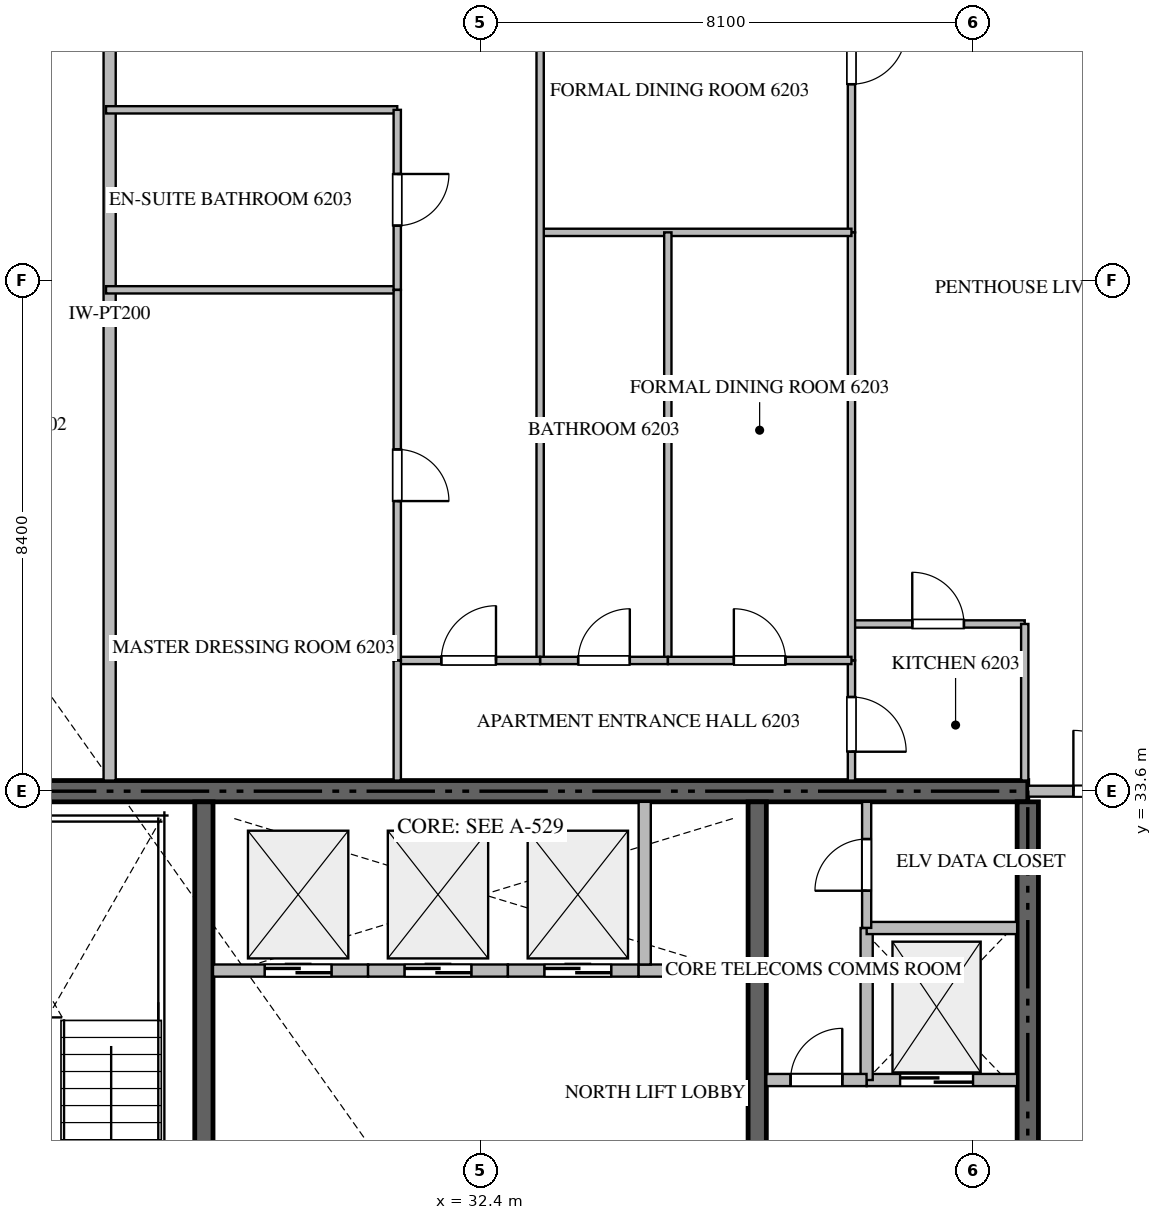
"""IFC4 building model, lengths in metres.
Left out: names, types, materials, properties, quantities, classifications, styles, units other than length and angle.
Written with IfcOpenShell. Run it as: python <this file> out.ifc"""

import sys

from ifc_helpers import new_model, si_unit, direction, frame, frame_2d, origin, place, context, subcontext, project, spatial, rectangle, extrude, source, transform, mapped, element, fill, save


model = new_model("IFC4")
c1 = context("Model", 3, precision=1e-05, world=origin(), true_north=direction((0.0, 1.0)))
c2 = subcontext(c1, "Body", "Model", "MODEL_VIEW")
j1 = project(units=[si_unit("LENGTHUNIT", "METRE"), si_unit("PLANEANGLEUNIT", "RADIAN")], contexts=[c1])
p1 = place(None, origin())
s1 = spatial("IfcSite", under=j1, at=p1, CompositionType="ELEMENT")
p2 = place(p1, origin())
s2 = spatial("IfcBuilding", under=s1, at=p2, CompositionType="ELEMENT")
p3 = place(p2, frame((0.0, 0.0, 248.95)))
s3 = spatial("IfcBuildingStorey", under=s2, at=p3, CompositionType="ELEMENT", Elevation=248.95)
p4 = place(p3, frame((41.4, 33.6, -0.26), z_axis=(0.0, 0.0, 1.0), x_axis=(-1.0, 0.0, 0.0)))
e1 = element("IfcWall", 1, at=p4, inside=s3, PredefinedType="SHEAR", context=c2, shape_type="SweptSolid", body=[
    extrude(rectangle(XDim=18.0, YDim=0.35, at=frame_2d((9.0, 0.0))), origin(), (0.0, 0.0, 1.0), 3.848),
])
p5 = place(p3, frame((41.4, 27.75, -0.26), z_axis=(0.0, 0.0, 1.0), x_axis=(0.0, 1.0, 0.0)))
e2 = element("IfcWall", 2, at=p5, inside=s3, PredefinedType="SHEAR", context=c2, shape_type="SweptSolid", body=[
    extrude(rectangle(XDim=5.675, YDim=0.35, at=frame_2d((2.837, 0.0))), origin(), (0.0, 0.0, 1.0), 3.848),
])
p6 = place(p3, frame((27.85, 23.55, -0.26), z_axis=(0.0, 0.0, 1.0), x_axis=(0.0, 1.0, 0.0)))
e3 = element("IfcWall", 3, at=p6, inside=s3, PredefinedType="SHEAR", context=c2, shape_type="SweptSolid", body=[
    extrude(rectangle(XDim=9.875, YDim=0.3, at=frame_2d((4.938, 0.0))), origin(), (0.0, 0.0, 1.0), 3.848),
])
p7 = place(p3, frame((36.95, 27.05, -0.26), z_axis=(0.0, 0.0, 1.0), x_axis=(0.0, 1.0, 0.0)))
e4 = element("IfcWall", 4, at=p7, inside=s3, PredefinedType="SHEAR", context=c2, shape_type="SweptSolid", body=[
    extrude(rectangle(XDim=6.375, YDim=0.3, at=frame_2d((3.188, 0.0))), origin(), (0.0, 0.0, 1.0), 3.848),
])
p8 = place(p3, frame((38.75, 28.85, 0.0), z_axis=(0.0, 0.0, 1.0), x_axis=(1.0, 0.0, 0.0)))
e5 = element("IfcWall", 5, at=p8, inside=s3, PredefinedType="STANDARD", context=c2, shape_type="SweptSolid", body=[
    extrude(rectangle(XDim=2.475, YDim=0.2, at=frame_2d((1.238, 0.0))), origin(), (0.0, 0.0, 1.0), 3.59),
])
p9 = place(p8, frame((0.55, 0.0, 0.0)))
e6 = element("IfcOpeningElement", 6, at=p9, cuts=e5, PredefinedType="OPENING", context=c2, shape_type="SweptSolid", body=[
    extrude(rectangle(XDim=1.2, YDim=2.2, at=frame_2d((0.6, 1.1))), frame((0.0, 0.11, 0.0), z_axis=(0.0, -1.0, 0.0), x_axis=(1.0, 0.0, 0.0)), (0.0, 0.0, 1.0), 0.22),
])
p10 = place(p3, frame((28.0, 30.65, 0.0), z_axis=(0.0, 0.0, 1.0), x_axis=(1.0, 0.0, 0.0)))
e7 = element("IfcWall", 7, at=p10, inside=s3, PredefinedType="STANDARD", context=c2, shape_type="SweptSolid", body=[
    extrude(rectangle(XDim=2.55, YDim=0.2, at=frame_2d((1.275, 0.0))), origin(), (0.0, 0.0, 1.0), 3.59),
])
p11 = place(p10, frame((0.85, 0.0, 0.0)))
e8 = element("IfcOpeningElement", 8, at=p11, cuts=e7, PredefinedType="OPENING", context=c2, shape_type="SweptSolid", body=[
    extrude(rectangle(XDim=1.1, YDim=2.2, at=frame_2d((0.55, 1.1))), frame((0.0, 0.11, 0.0), z_axis=(0.0, -1.0, 0.0), x_axis=(1.0, 0.0, 0.0)), (0.0, 0.0, 1.0), 0.22),
])
p12 = place(p3, frame((30.55, 30.65, 0.0), z_axis=(0.0, 0.0, 1.0), x_axis=(1.0, 0.0, 0.0)))
e9 = element("IfcWall", 9, at=p12, inside=s3, PredefinedType="STANDARD", context=c2, shape_type="SweptSolid", body=[
    extrude(rectangle(XDim=2.3, YDim=0.2, at=frame_2d((1.15, 0.0))), origin(), (0.0, 0.0, 1.0), 3.59),
])
p13 = place(p12, frame((0.6, 0.0, 0.0)))
e10 = element("IfcOpeningElement", 10, at=p13, cuts=e9, PredefinedType="OPENING", context=c2, shape_type="SweptSolid", body=[
    extrude(rectangle(XDim=1.1, YDim=2.2, at=frame_2d((0.55, 1.1))), frame((0.0, 0.11, 0.0), z_axis=(0.0, -1.0, 0.0), x_axis=(1.0, 0.0, 0.0)), (0.0, 0.0, 1.0), 0.22),
])
p14 = place(p3, frame((32.85, 30.65, 0.0), z_axis=(0.0, 0.0, 1.0), x_axis=(1.0, 0.0, 0.0)))
e11 = element("IfcWall", 11, at=p14, inside=s3, PredefinedType="STANDARD", context=c2, shape_type="SweptSolid", body=[
    extrude(rectangle(XDim=2.15, YDim=0.2, at=frame_2d((1.075, 0.0))), origin(), (0.0, 0.0, 1.0), 3.59),
])
p15 = place(p14, frame((0.6, 0.0, 0.0)))
e12 = element("IfcOpeningElement", 12, at=p15, cuts=e11, PredefinedType="OPENING", context=c2, shape_type="SweptSolid", body=[
    extrude(rectangle(XDim=1.1, YDim=2.2, at=frame_2d((0.55, 1.1))), frame((0.0, 0.11, 0.0), z_axis=(0.0, -1.0, 0.0), x_axis=(1.0, 0.0, 0.0)), (0.0, 0.0, 1.0), 0.22),
])
p16 = place(p3, frame((35.0, 30.65, 0.0), z_axis=(0.0, 0.0, 1.0), x_axis=(1.0, 0.0, 0.0)))
e13 = element("IfcWall", 13, at=p16, inside=s3, PredefinedType="STANDARD", context=c2, shape_type="SweptSolid", body=[
    extrude(rectangle(XDim=1.8, YDim=0.2, at=frame_2d((0.9, 0.0))), origin(), (0.0, 0.0, 1.0), 3.59),
])
p17 = place(p3, frame((35.1, 30.75, 0.0), z_axis=(0.0, 0.0, 1.0), x_axis=(0.0, 1.0, 0.0)))
e14 = element("IfcWall", 14, at=p17, inside=s3, PredefinedType="STANDARD", context=c2, shape_type="SweptSolid", body=[
    extrude(rectangle(XDim=2.675, YDim=0.2, at=frame_2d((1.337, 0.0))), origin(), (0.0, 0.0, 1.0), 3.59),
])
p18 = place(p3, frame((38.75, 28.85, 0.0), z_axis=(0.0, 0.0, 1.0), x_axis=(0.0, 1.0, 0.0)))
e15 = element("IfcWall", 15, at=p18, inside=s3, PredefinedType="STANDARD", context=c2, shape_type="SweptSolid", body=[
    extrude(rectangle(XDim=2.5, YDim=0.2, at=frame_2d((1.25, 0.0))), origin(), (0.0, 0.0, 1.0), 3.59),
])
p19 = place(p3, frame((38.75, 31.35, 0.0), z_axis=(0.0, 0.0, 1.0), x_axis=(1.0, 0.0, 0.0)))
e16 = element("IfcWall", 16, at=p19, inside=s3, PredefinedType="STANDARD", context=c2, shape_type="SweptSolid", body=[
    extrude(rectangle(XDim=2.475, YDim=0.2, at=frame_2d((1.238, 0.0))), origin(), (0.0, 0.0, 1.0), 3.59),
])
p20 = place(p3, frame((37.1, 28.85, 0.0), z_axis=(0.0, 0.0, 1.0), x_axis=(1.0, 0.0, 0.0)))
e17 = element("IfcWall", 17, at=p20, inside=s3, PredefinedType="STANDARD", context=c2, shape_type="SweptSolid", body=[
    extrude(rectangle(XDim=1.648, YDim=0.2, at=frame_2d((0.824, 0.0))), origin(), (0.0, 0.0, 1.0), 3.59),
])
p21 = place(p20, frame((0.399, 0.0, 0.0)))
e18 = element("IfcOpeningElement", 18, at=p21, cuts=e17, PredefinedType="OPENING", context=c2, shape_type="SweptSolid", body=[
    extrude(rectangle(XDim=0.85, YDim=2.1, at=frame_2d((0.425, 1.05))), frame((0.0, 0.11, 0.0), z_axis=(0.0, -1.0, 0.0), x_axis=(1.0, 0.0, 0.0)), (0.0, 0.0, 1.0), 0.22),
])
p22 = place(p3, frame((38.75, 31.352, 0.0), z_axis=(0.0, 0.0, 1.0), x_axis=(0.0, 1.0, 0.0)))
e19 = element("IfcWall", 19, at=p22, inside=s3, PredefinedType="PARTITIONING", context=c2, shape_type="SweptSolid", body=[
    extrude(rectangle(XDim=2.073, YDim=0.15, at=frame_2d((1.037, 0.0))), origin(), (0.0, 0.0, 1.0), 3.59),
])
p23 = place(p22, frame((0.611, 0.0, 0.0)))
e20 = element("IfcOpeningElement", 20, at=p23, cuts=e19, PredefinedType="OPENING", context=c2, shape_type="SweptSolid", body=[
    extrude(rectangle(XDim=0.85, YDim=2.1, at=frame_2d((0.425, 1.05))), frame((0.0, 0.085, 0.0), z_axis=(0.0, -1.0, 0.0), x_axis=(1.0, 0.0, 0.0)), (0.0, 0.0, 1.0), 0.17),
])
p24 = place(p3, frame((26.3, 33.775, 0.0), z_axis=(0.0, 0.0, 1.0), x_axis=(0.0, 1.0, 0.0)))
e21 = element("IfcWall", 21, at=p24, inside=s3, PredefinedType="PARTITIONING", context=c2, shape_type="SweptSolid", body=[
    extrude(rectangle(XDim=15.343, YDim=0.2, at=frame_2d((7.671, 0.0))), origin(), (0.0, 0.0, 1.0), 3.59),
])
p25 = place(p3, frame((41.402, 33.6, 0.0), z_axis=(0.0, 0.0, 1.0), x_axis=(1.0, 0.0, 0.0)))
e22 = element("IfcWall", 22, at=p25, inside=s3, PredefinedType="PARTITIONING", context=c2, shape_type="SweptSolid", body=[
    extrude(rectangle(XDim=2.496, YDim=0.18, at=frame_2d((1.248, 0.0))), origin(), (0.0, 0.0, 1.0), 3.59),
])
p26 = place(p25, frame((0.748, 0.0, 0.0)))
e23 = element("IfcOpeningElement", 23, at=p26, cuts=e22, PredefinedType="OPENING", context=c2, shape_type="SweptSolid", body=[
    extrude(rectangle(XDim=1.0, YDim=2.15, at=frame_2d((0.5, 1.075))), frame((0.0, 0.1, 0.0), z_axis=(0.0, -1.0, 0.0), x_axis=(1.0, 0.0, 0.0)), (0.0, 0.0, 1.0), 0.2),
])
p27 = place(p3, frame((38.5, 36.35, 0.0), z_axis=(0.0, 0.0, 1.0), x_axis=(1.0, 0.0, 0.0)))
e24 = element("IfcWall", 24, at=p27, inside=s3, PredefinedType="PARTITIONING", context=c2, shape_type="SweptSolid", body=[
    extrude(rectangle(XDim=2.85, YDim=0.12, at=frame_2d((1.425, 0.0))), origin(), (0.0, 0.0, 1.0), 3.59),
])
p28 = place(p27, frame((1.0, 0.0, 0.0)))
e25 = element("IfcOpeningElement", 25, at=p28, cuts=e24, PredefinedType="OPENING", context=c2, shape_type="SweptSolid", body=[
    extrude(rectangle(XDim=0.85, YDim=2.1, at=frame_2d((0.425, 1.05))), frame((0.0, 0.07, 0.0), z_axis=(0.0, -1.0, 0.0), x_axis=(1.0, 0.0, 0.0)), (0.0, 0.0, 1.0), 0.14),
])
p29 = place(p3, frame((41.35, 36.35, 0.0), z_axis=(0.0, 0.0, 1.0), x_axis=(0.0, -1.0, 0.0)))
e26 = element("IfcWall", 26, at=p29, inside=s3, PredefinedType="PARTITIONING", context=c2, shape_type="SweptSolid", body=[
    extrude(rectangle(XDim=2.575, YDim=0.12, at=frame_2d((1.288, 0.0))), origin(), (0.0, 0.0, 1.0), 3.59),
])
p30 = place(p3, frame((38.5, 35.75, 0.0), z_axis=(0.0, 0.0, 1.0), x_axis=(0.0, -1.0, 0.0)))
e27 = element("IfcWall", 27, at=p30, inside=s3, PredefinedType="PARTITIONING", context=c2, shape_type="SweptSolid", body=[
    extrude(rectangle(XDim=1.975, YDim=0.12, at=frame_2d((0.988, 0.0))), origin(), (0.0, 0.0, 1.0), 3.59),
])
p31 = place(p30, frame((0.601, 0.0, 0.0)))
e28 = element("IfcOpeningElement", 28, at=p31, cuts=e27, PredefinedType="OPENING", context=c2, shape_type="SweptSolid", body=[
    extrude(rectangle(XDim=0.9, YDim=2.1, at=frame_2d((0.45, 1.05))), frame((0.0, 0.07, 0.0), z_axis=(0.0, -1.0, 0.0), x_axis=(1.0, 0.0, 0.0)), (0.0, 0.0, 1.0), 0.14),
])
p32 = place(p3, frame((38.5, 49.105, 0.0), z_axis=(0.0, 0.0, 1.0), x_axis=(0.0, -1.0, 0.0)))
e29 = element("IfcWall", 29, at=p32, inside=s3, PredefinedType="PARTITIONING", context=c2, shape_type="SweptSolid", body=[
    extrude(rectangle(XDim=6.315, YDim=0.12, at=frame_2d((3.157, 0.0))), origin(), (0.0, 0.0, 1.0), 3.59),
])
p33 = place(p32, frame((2.978, 0.0, 0.0)))
e30 = element("IfcOpeningElement", 30, at=p33, cuts=e29, PredefinedType="OPENING", context=c2, shape_type="SweptSolid", body=[
    extrude(rectangle(XDim=0.9, YDim=2.1, at=frame_2d((0.45, 1.05))), frame((0.0, 0.07, 0.0), z_axis=(0.0, -1.0, 0.0), x_axis=(1.0, 0.0, 0.0)), (0.0, 0.0, 1.0), 0.14),
])
p34 = place(p3, frame((38.5, 42.788, 0.0), z_axis=(0.0, 0.0, 1.0), x_axis=(0.0, -1.0, 0.0)))
e31 = element("IfcWall", 31, at=p34, inside=s3, PredefinedType="PARTITIONING", context=c2, shape_type="SweptSolid", body=[
    extrude(rectangle(XDim=7.036, YDim=0.12, at=frame_2d((3.518, 0.0))), origin(), (0.0, 0.0, 1.0), 3.59),
])
p35 = place(p3, frame((33.38, 42.79, 0.0), z_axis=(0.0, 0.0, 1.0), x_axis=(1.0, 0.0, 0.0)))
e32 = element("IfcWall", 32, at=p35, inside=s3, PredefinedType="PARTITIONING", context=c2, shape_type="SweptSolid", body=[
    extrude(rectangle(XDim=5.12, YDim=0.12, at=frame_2d((2.56, 0.0))), origin(), (0.0, 0.0, 1.0), 3.59),
])
p36 = place(p3, frame((33.38, 49.105, 0.0), z_axis=(0.0, 0.0, 1.0), x_axis=(0.0, -1.0, 0.0)))
e33 = element("IfcWall", 33, at=p36, inside=s3, PredefinedType="PARTITIONING", context=c2, shape_type="SweptSolid", body=[
    extrude(rectangle(XDim=13.355, YDim=0.12, at=frame_2d((6.677, 0.0))), origin(), (0.0, 0.0, 1.0), 3.59),
])
p37 = place(p3, frame((35.48, 42.79, 0.0), z_axis=(0.0, 0.0, 1.0), x_axis=(0.0, -1.0, 0.0)))
e34 = element("IfcWall", 34, at=p37, inside=s3, PredefinedType="PARTITIONING", context=c2, shape_type="SweptSolid", body=[
    extrude(rectangle(XDim=7.04, YDim=0.12, at=frame_2d((3.52, 0.0))), origin(), (0.0, 0.0, 1.0), 3.59),
])
p38 = place(p3, frame((33.38, 35.75, 0.0), z_axis=(0.0, 0.0, 1.0), x_axis=(1.0, 0.0, 0.0)))
e35 = element("IfcWall", 35, at=p38, inside=s3, PredefinedType="PARTITIONING", context=c2, shape_type="SweptSolid", body=[
    extrude(rectangle(XDim=2.1, YDim=0.12, at=frame_2d((1.05, 0.0))), origin(), (0.0, 0.0, 1.0), 3.59),
])
p39 = place(p38, frame((0.625, 0.0, 0.0)))
e36 = element("IfcOpeningElement", 36, at=p39, cuts=e35, PredefinedType="OPENING", context=c2, shape_type="SweptSolid", body=[
    extrude(rectangle(XDim=0.85, YDim=2.1, at=frame_2d((0.425, 1.05))), frame((0.0, 0.07, 0.0), z_axis=(0.0, -1.0, 0.0), x_axis=(1.0, 0.0, 0.0)), (0.0, 0.0, 1.0), 0.14),
])
p40 = place(p3, frame((35.482, 35.75, 0.0), z_axis=(0.0, 0.0, 1.0), x_axis=(1.0, 0.0, 0.0)))
e37 = element("IfcWall", 37, at=p40, inside=s3, PredefinedType="PARTITIONING", context=c2, shape_type="SweptSolid", body=[
    extrude(rectangle(XDim=3.018, YDim=0.12, at=frame_2d((1.509, 0.0))), origin(), (0.0, 0.0, 1.0), 3.59),
])
p41 = place(p40, frame((1.084, 0.0, 0.0)))
e38 = element("IfcOpeningElement", 38, at=p41, cuts=e37, PredefinedType="OPENING", context=c2, shape_type="SweptSolid", body=[
    extrude(rectangle(XDim=0.85, YDim=2.1, at=frame_2d((0.425, 1.05))), frame((0.0, 0.07, 0.0), z_axis=(0.0, -1.0, 0.0), x_axis=(1.0, 0.0, 0.0)), (0.0, 0.0, 1.0), 0.14),
])
p42 = place(p3, frame((31.03, 35.75, 0.0), z_axis=(0.0, 0.0, 1.0), x_axis=(1.0, 0.0, 0.0)))
e39 = element("IfcWall", 39, at=p42, inside=s3, PredefinedType="PARTITIONING", context=c2, shape_type="SweptSolid", body=[
    extrude(rectangle(XDim=2.348, YDim=0.12, at=frame_2d((1.174, 0.0))), origin(), (0.0, 0.0, 1.0), 3.59),
])
p43 = place(p42, frame((0.724, 0.0, 0.0)))
e40 = element("IfcOpeningElement", 40, at=p43, cuts=e39, PredefinedType="OPENING", context=c2, shape_type="SweptSolid", body=[
    extrude(rectangle(XDim=0.9, YDim=2.1, at=frame_2d((0.45, 1.05))), frame((0.0, 0.07, 0.0), z_axis=(0.0, -1.0, 0.0), x_axis=(1.0, 0.0, 0.0)), (0.0, 0.0, 1.0), 0.14),
])
for number, where, z_axis, x_axis in (
    (41, (26.24, 44.805, 0.0), (0.0, 0.0, 1.0), (1.0, 0.0, 0.0)),
    (42, (26.24, 41.845, 0.0), (0.0, 0.0, 1.0), (1.0, 0.0, 0.0)),
):
    element("IfcWall", number, at=place(p3, frame(where, z_axis=z_axis, x_axis=x_axis)), inside=s3, PredefinedType="PARTITIONING", context=c2, shape_type="SweptSolid", body=[
        extrude(rectangle(XDim=4.79, YDim=0.12, at=frame_2d((2.395, 0.0))), origin(), (0.0, 0.0, 1.0), 3.59),
    ])
p44 = place(p3, frame((31.03, 44.805, 0.0), z_axis=(0.0, 0.0, 1.0), x_axis=(0.0, -1.0, 0.0)))
e43 = element("IfcWall", 43, at=p44, inside=s3, PredefinedType="PARTITIONING", context=c2, shape_type="SweptSolid", body=[
    extrude(rectangle(XDim=2.96, YDim=0.12, at=frame_2d((1.48, 0.0))), origin(), (0.0, 0.0, 1.0), 3.59),
])
p45 = place(p44, frame((1.055, 0.0, 0.0)))
e44 = element("IfcOpeningElement", 44, at=p45, cuts=e43, PredefinedType="OPENING", context=c2, shape_type="SweptSolid", body=[
    extrude(rectangle(XDim=0.85, YDim=2.1, at=frame_2d((0.425, 1.05))), frame((0.0, 0.07, 0.0), z_axis=(0.0, -1.0, 0.0), x_axis=(1.0, 0.0, 0.0)), (0.0, 0.0, 1.0), 0.14),
])
p46 = place(p3, frame((31.03, 41.843, 0.0), z_axis=(0.0, 0.0, 1.0), x_axis=(0.0, -1.0, 0.0)))
e45 = element("IfcWall", 45, at=p46, inside=s3, PredefinedType="PARTITIONING", context=c2, shape_type="SweptSolid", body=[
    extrude(rectangle(XDim=6.093, YDim=0.12, at=frame_2d((3.046, 0.0))), origin(), (0.0, 0.0, 1.0), 3.59),
])
p47 = place(p46, frame((2.622, 0.0, 0.0)))
e46 = element("IfcOpeningElement", 46, at=p47, cuts=e45, PredefinedType="OPENING", context=c2, shape_type="SweptSolid", body=[
    extrude(rectangle(XDim=0.85, YDim=2.1, at=frame_2d((0.425, 1.05))), frame((0.0, 0.07, 0.0), z_axis=(0.0, -1.0, 0.0), x_axis=(1.0, 0.0, 0.0)), (0.0, 0.0, 1.0), 0.14),
])
p48 = place(p3, frame((31.03, 35.748, 0.0), z_axis=(0.0, 0.0, 1.0), x_axis=(0.0, -1.0, 0.0)))
e47 = element("IfcWall", 47, at=p48, inside=s3, PredefinedType="PARTITIONING", context=c2, shape_type="SweptSolid", body=[
    extrude(rectangle(XDim=1.973, YDim=0.12, at=frame_2d((0.987, 0.0))), origin(), (0.0, 0.0, 1.0), 3.59),
])
m1 = source(origin(), c2, "Body", "SweptSolid", [
    extrude(rectangle(XDim=1.2, YDim=2.2, at=frame_2d((0.6, 1.1))), frame((0.0, 0.025, 0.0), z_axis=(0.0, -1.0, 0.0), x_axis=(1.0, 0.0, 0.0)), (0.0, 0.0, 1.0), 0.05),
])
p49 = place(p9, origin())
e48 = element("IfcDoor", 48, at=p49, inside=s3, OperationType="DOUBLE_DOOR_SLIDING", PredefinedType="DOOR", context=c2, shape_type="MappedRepresentation", body=[
    mapped(m1, transform((0.0, 0.0, 0.0), scale=1.0)),
])
fill(e6, e48)
m2 = source(origin(), c2, "Body", "SweptSolid", [
    extrude(rectangle(XDim=1.1, YDim=2.2, at=frame_2d((0.55, 1.1))), frame((0.0, 0.025, 0.0), z_axis=(0.0, -1.0, 0.0), x_axis=(1.0, 0.0, 0.0)), (0.0, 0.0, 1.0), 0.05),
])
p50 = place(p11, origin())
e49 = element("IfcDoor", 49, at=p50, inside=s3, OperationType="DOUBLE_DOOR_SLIDING", PredefinedType="DOOR", context=c2, shape_type="MappedRepresentation", body=[
    mapped(m2, transform((0.0, 0.0, 0.0), scale=1.0)),
])
fill(e8, e49)
p51 = place(p13, origin())
e50 = element("IfcDoor", 50, at=p51, inside=s3, OperationType="DOUBLE_DOOR_SLIDING", PredefinedType="DOOR", context=c2, shape_type="MappedRepresentation", body=[
    mapped(m2, transform((0.0, 0.0, 0.0), scale=1.0)),
])
fill(e10, e50)
p52 = place(p15, origin())
e51 = element("IfcDoor", 51, at=p52, inside=s3, OperationType="DOUBLE_DOOR_SLIDING", PredefinedType="DOOR", context=c2, shape_type="MappedRepresentation", body=[
    mapped(m2, transform((0.0, 0.0, 0.0), scale=1.0)),
])
fill(e12, e51)
m3 = source(origin(), c2, "Body", "SweptSolid", [
    extrude(rectangle(XDim=0.85, YDim=2.1, at=frame_2d((0.425, 1.05))), frame((0.0, 0.025, 0.0), z_axis=(0.0, -1.0, 0.0), x_axis=(1.0, 0.0, 0.0)), (0.0, 0.0, 1.0), 0.05),
])
p53 = place(p21, origin())
e52 = element("IfcDoor", 52, at=p53, inside=s3, OperationType="SINGLE_SWING_RIGHT", PredefinedType="DOOR", context=c2, shape_type="MappedRepresentation", body=[
    mapped(m3, transform((0.0, 0.0, 0.0), scale=1.0)),
])
fill(e18, e52)
p54 = place(p23, origin())
e53 = element("IfcDoor", 53, at=p54, inside=s3, OperationType="SINGLE_SWING_LEFT", PredefinedType="DOOR", context=c2, shape_type="MappedRepresentation", body=[
    mapped(m3, transform((0.0, 0.0, 0.0), scale=1.0)),
])
fill(e20, e53)
m4 = source(origin(), c2, "Body", "SweptSolid", [
    extrude(rectangle(XDim=1.0, YDim=2.15, at=frame_2d((0.5, 1.075))), frame((0.0, 0.025, 0.0), z_axis=(0.0, -1.0, 0.0), x_axis=(1.0, 0.0, 0.0)), (0.0, 0.0, 1.0), 0.05),
])
p55 = place(p26, origin())
e54 = element("IfcDoor", 54, at=p55, inside=s3, OperationType="SINGLE_SWING_LEFT", PredefinedType="DOOR", context=c2, shape_type="MappedRepresentation", body=[
    mapped(m4, transform((0.0, 0.0, 0.0), scale=1.0)),
])
fill(e23, e54)
p56 = place(p28, origin())
e55 = element("IfcDoor", 55, at=p56, inside=s3, OperationType="SINGLE_SWING_LEFT", PredefinedType="DOOR", context=c2, shape_type="MappedRepresentation", body=[
    mapped(m3, transform((0.0, 0.0, 0.0), scale=1.0)),
])
fill(e25, e55)
m5 = source(origin(), c2, "Body", "SweptSolid", [
    extrude(rectangle(XDim=0.9, YDim=2.1, at=frame_2d((0.45, 1.05))), frame((0.0, 0.025, 0.0), z_axis=(0.0, -1.0, 0.0), x_axis=(1.0, 0.0, 0.0)), (0.0, 0.0, 1.0), 0.05),
])
p57 = place(p31, origin())
e56 = element("IfcDoor", 56, at=p57, inside=s3, OperationType="SINGLE_SWING_RIGHT", PredefinedType="DOOR", context=c2, shape_type="MappedRepresentation", body=[
    mapped(m5, transform((0.0, 0.0, 0.0), scale=1.0)),
])
fill(e28, e56)
p58 = place(p33, origin())
e57 = element("IfcDoor", 57, at=p58, inside=s3, OperationType="SINGLE_SWING_LEFT", PredefinedType="DOOR", context=c2, shape_type="MappedRepresentation", body=[
    mapped(m5, transform((0.0, 0.0, 0.0), scale=1.0)),
])
fill(e30, e57)
p59 = place(p39, origin())
e58 = element("IfcDoor", 58, at=p59, inside=s3, OperationType="SINGLE_SWING_RIGHT", PredefinedType="DOOR", context=c2, shape_type="MappedRepresentation", body=[
    mapped(m3, transform((0.0, 0.0, 0.0), scale=1.0)),
])
fill(e36, e58)
p60 = place(p41, origin())
e59 = element("IfcDoor", 59, at=p60, inside=s3, OperationType="SINGLE_SWING_LEFT", PredefinedType="DOOR", context=c2, shape_type="MappedRepresentation", body=[
    mapped(m3, transform((0.0, 0.0, 0.0), scale=1.0)),
])
fill(e38, e59)
p61 = place(p43, origin())
e60 = element("IfcDoor", 60, at=p61, inside=s3, OperationType="SINGLE_SWING_RIGHT", PredefinedType="DOOR", context=c2, shape_type="MappedRepresentation", body=[
    mapped(m5, transform((0.0, 0.0, 0.0), scale=1.0)),
])
fill(e40, e60)
p62 = place(p45, origin())
e61 = element("IfcDoor", 61, at=p62, inside=s3, OperationType="SINGLE_SWING_LEFT", PredefinedType="DOOR", context=c2, shape_type="MappedRepresentation", body=[
    mapped(m3, transform((0.0, 0.0, 0.0), scale=1.0)),
])
fill(e44, e61)
p63 = place(p47, origin())
e62 = element("IfcDoor", 62, at=p63, inside=s3, OperationType="SINGLE_SWING_RIGHT", PredefinedType="DOOR", context=c2, shape_type="MappedRepresentation", body=[
    mapped(m3, transform((0.0, 0.0, 0.0), scale=1.0)),
])
fill(e46, e62)
save(model, sys.argv[1])
